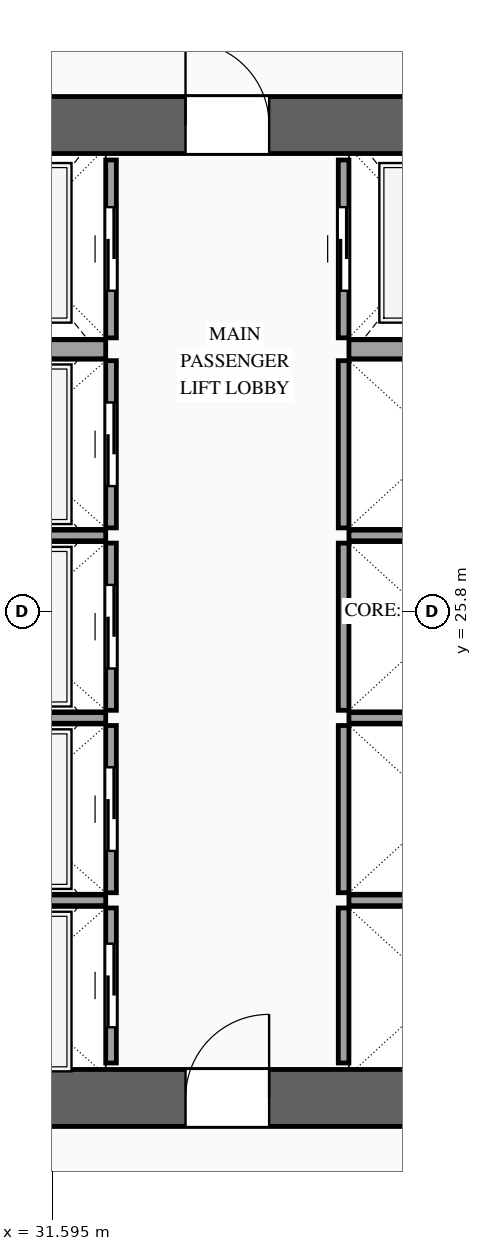
"""IFC4 building model, lengths in metres.
Left out: names, types, materials, properties, quantities, classifications, styles, units other than length and angle.
Written with IfcOpenShell. Run it as: python <this file> out.ifc"""

import sys

from ifc_helpers import new_model, si_unit, direction, frame, frame_2d, origin, place, context, subcontext, project, spatial, rectangle, extrude, source, transform, mapped, element, fill, save


model = new_model("IFC4")
c1 = context("Model", 3, precision=1e-05, world=origin(), true_north=direction((0.0, 1.0)))
c2 = subcontext(c1, "Body", "Model", "MODEL_VIEW")
j1 = project(units=[si_unit("LENGTHUNIT", "METRE"), si_unit("PLANEANGLEUNIT", "RADIAN")], contexts=[c1])
p1 = place(None, origin())
s1 = spatial("IfcSite", under=j1, at=p1, CompositionType="ELEMENT")
p2 = place(p1, origin())
s2 = spatial("IfcBuilding", under=s1, at=p2, CompositionType="ELEMENT")
p3 = place(p2, frame((0.0, 0.0, 141.6)))
s3 = spatial("IfcBuildingStorey", under=s2, at=p3, CompositionType="ELEMENT", Elevation=141.6)
p4 = place(p3, frame((23.425, 19.4, 0.0), z_axis=(0.0, 0.0, 1.0), x_axis=(1.0, 0.0, 0.0)))
e1 = element("IfcWall", 1, at=p4, inside=s3, PredefinedType="SHEAR", context=c2, shape_type="SweptSolid", body=[
    extrude(rectangle(XDim=27.15, YDim=0.75, at=frame_2d((13.575, 0.0))), origin(), (0.0, 0.0, 1.0), 3.6),
])
p5 = place(p4, frame((2.025, 0.0, 0.0)))
e2 = element("IfcOpeningElement", 2, at=p5, cuts=e1, PredefinedType="OPENING", context=c2, shape_type="SweptSolid", body=[
    extrude(rectangle(XDim=1.1, YDim=2.2, at=frame_2d((0.55, 1.1))), frame((0.0, 0.39, 0.0), z_axis=(0.0, -1.0, 0.0), x_axis=(1.0, 0.0, 0.0)), (0.0, 0.0, 1.0), 0.78),
])
p6 = place(p4, frame((9.925, 0.0, 0.0)))
e3 = element("IfcOpeningElement", 3, at=p6, cuts=e1, PredefinedType="OPENING", context=c2, shape_type="SweptSolid", body=[
    extrude(rectangle(XDim=1.1, YDim=2.2, at=frame_2d((0.55, 1.1))), frame((0.0, 0.39, 0.0), z_axis=(0.0, -1.0, 0.0), x_axis=(1.0, 0.0, 0.0)), (0.0, 0.0, 1.0), 0.78),
])
p7 = place(p4, frame((23.125, 0.0, 0.0)))
e4 = element("IfcOpeningElement", 4, at=p7, cuts=e1, PredefinedType="OPENING", context=c2, shape_type="SweptSolid", body=[
    extrude(rectangle(XDim=1.1, YDim=2.2, at=frame_2d((0.55, 1.1))), frame((0.0, 0.39, 0.0), z_axis=(0.0, -1.0, 0.0), x_axis=(1.0, 0.0, 0.0)), (0.0, 0.0, 1.0), 0.78),
])
p8 = place(p4, frame((19.745, 0.0, 0.0)))
e5 = element("IfcOpeningElement", 5, at=p8, cuts=e1, PredefinedType="OPENING", context=c2, shape_type="SweptSolid", body=[
    extrude(rectangle(XDim=0.9, YDim=2.15, at=frame_2d((0.45, 1.075))), frame((0.0, 0.39, 0.0), z_axis=(0.0, -1.0, 0.0), x_axis=(1.0, 0.0, 0.0)), (0.0, 0.0, 1.0), 0.78),
])
p9 = place(p4, frame((18.305, 0.0, 0.0)))
e6 = element("IfcOpeningElement", 6, at=p9, cuts=e1, PredefinedType="OPENING", context=c2, shape_type="SweptSolid", body=[
    extrude(rectangle(XDim=0.9, YDim=2.15, at=frame_2d((0.45, 1.075))), frame((0.0, 0.39, 0.0), z_axis=(0.0, -1.0, 0.0), x_axis=(1.0, 0.0, 0.0)), (0.0, 0.0, 1.0), 0.78),
])
p10 = place(p3, frame((23.425, 32.2, 0.0), z_axis=(0.0, 0.0, 1.0), x_axis=(1.0, 0.0, 0.0)))
e7 = element("IfcWall", 7, at=p10, inside=s3, PredefinedType="SHEAR", context=c2, shape_type="SweptSolid", body=[
    extrude(rectangle(XDim=27.15, YDim=0.75, at=frame_2d((13.575, 0.0))), origin(), (0.0, 0.0, 1.0), 3.6),
])
p11 = place(p10, frame((4.645, 0.0, 0.0)))
e8 = element("IfcOpeningElement", 8, at=p11, cuts=e7, PredefinedType="OPENING", context=c2, shape_type="SweptSolid", body=[
    extrude(rectangle(XDim=0.9, YDim=2.15, at=frame_2d((0.45, 1.075))), frame((0.0, 0.39, 0.0), z_axis=(0.0, -1.0, 0.0), x_axis=(1.0, 0.0, 0.0)), (0.0, 0.0, 1.0), 0.78),
])
p12 = place(p10, frame((9.925, 0.0, 0.0)))
e9 = element("IfcOpeningElement", 9, at=p12, cuts=e7, PredefinedType="OPENING", context=c2, shape_type="SweptSolid", body=[
    extrude(rectangle(XDim=1.1, YDim=2.2, at=frame_2d((0.55, 1.1))), frame((0.0, 0.39, 0.0), z_axis=(0.0, -1.0, 0.0), x_axis=(1.0, 0.0, 0.0)), (0.0, 0.0, 1.0), 0.78),
])
p13 = place(p10, frame((15.775, 0.0, 0.0)))
e10 = element("IfcOpeningElement", 10, at=p13, cuts=e7, PredefinedType="OPENING", context=c2, shape_type="SweptSolid", body=[
    extrude(rectangle(XDim=1.1, YDim=2.2, at=frame_2d((0.55, 1.1))), frame((0.0, 0.39, 0.0), z_axis=(0.0, -1.0, 0.0), x_axis=(1.0, 0.0, 0.0)), (0.0, 0.0, 1.0), 0.78),
])
p14 = place(p10, frame((18.975, 0.0, 0.0)))
e11 = element("IfcOpeningElement", 11, at=p14, cuts=e7, PredefinedType="OPENING", context=c2, shape_type="SweptSolid", body=[
    extrude(rectangle(XDim=0.9, YDim=2.15, at=frame_2d((0.45, 1.075))), frame((0.0, 0.39, 0.0), z_axis=(0.0, -1.0, 0.0), x_axis=(1.0, 0.0, 0.0)), (0.0, 0.0, 1.0), 0.78),
])
p15 = place(p3, frame((32.37, 19.86, 0.0), z_axis=(0.0, 0.0, 1.0), x_axis=(0.0, 1.0, 0.0)))
e12 = element("IfcWall", 12, at=p15, inside=s3, PredefinedType="SOLIDWALL", context=c2, shape_type="SweptSolid", body=[
    extrude(rectangle(XDim=2.04, YDim=0.14, at=frame_2d((1.02, 0.0))), origin(), (0.0, 0.0, 1.0), 3.38),
])
p16 = place(p15, frame((0.47, 0.0, 0.0)))
e13 = element("IfcOpeningElement", 13, at=p16, cuts=e12, PredefinedType="OPENING", context=c2, shape_type="SweptSolid", body=[
    extrude(rectangle(XDim=1.1, YDim=2.2, at=frame_2d((0.55, 1.1))), frame((0.0, 0.085, 0.0), z_axis=(0.0, -1.0, 0.0), x_axis=(1.0, 0.0, 0.0)), (0.0, 0.0, 1.0), 0.17),
])
m1 = source(origin(), c2, "Body", "SweptSolid", [
    extrude(rectangle(XDim=2.5, YDim=0.14, at=frame_2d((1.25, 0.0))), origin(), (0.0, 0.0, 1.0), 3.38),
])
p17 = place(p3, frame((29.8, 22.0, 0.0), z_axis=(0.0, 0.0, 1.0), x_axis=(1.0, 0.0, 0.0)))
e14 = element("IfcWall", 14, at=p17, inside=s3, PredefinedType="SOLIDWALL", context=c2, shape_type="MappedRepresentation", body=[
    mapped(m1, transform((0.0, 0.0, 0.0), scale=1.0)),
])
p18 = place(p3, frame((32.37, 22.1, 0.0), z_axis=(0.0, 0.0, 1.0), x_axis=(0.0, 1.0, 0.0)))
e15 = element("IfcWall", 15, at=p18, inside=s3, PredefinedType="SOLIDWALL", context=c2, shape_type="SweptSolid", body=[
    extrude(rectangle(XDim=2.2, YDim=0.14, at=frame_2d((1.1, 0.0))), origin(), (0.0, 0.0, 1.0), 3.38),
])
p19 = place(p18, frame((0.55, 0.0, 0.0)))
e16 = element("IfcOpeningElement", 16, at=p19, cuts=e15, PredefinedType="OPENING", context=c2, shape_type="SweptSolid", body=[
    extrude(rectangle(XDim=1.1, YDim=2.2, at=frame_2d((0.55, 1.1))), frame((0.0, 0.085, 0.0), z_axis=(0.0, -1.0, 0.0), x_axis=(1.0, 0.0, 0.0)), (0.0, 0.0, 1.0), 0.17),
])
p20 = place(p3, frame((29.8, 24.4, 0.0), z_axis=(0.0, 0.0, 1.0), x_axis=(1.0, 0.0, 0.0)))
e17 = element("IfcWall", 17, at=p20, inside=s3, PredefinedType="SOLIDWALL", context=c2, shape_type="MappedRepresentation", body=[
    mapped(m1, transform((0.0, 0.0, 0.0), scale=1.0)),
])
p21 = place(p3, frame((32.37, 24.5, 0.0), z_axis=(0.0, 0.0, 1.0), x_axis=(0.0, 1.0, 0.0)))
e18 = element("IfcWall", 18, at=p21, inside=s3, PredefinedType="SOLIDWALL", context=c2, shape_type="SweptSolid", body=[
    extrude(rectangle(XDim=2.2, YDim=0.14, at=frame_2d((1.1, 0.0))), origin(), (0.0, 0.0, 1.0), 3.38),
])
p22 = place(p21, frame((0.55, 0.0, 0.0)))
e19 = element("IfcOpeningElement", 19, at=p22, cuts=e18, PredefinedType="OPENING", context=c2, shape_type="SweptSolid", body=[
    extrude(rectangle(XDim=1.1, YDim=2.2, at=frame_2d((0.55, 1.1))), frame((0.0, 0.085, 0.0), z_axis=(0.0, -1.0, 0.0), x_axis=(1.0, 0.0, 0.0)), (0.0, 0.0, 1.0), 0.17),
])
p23 = place(p3, frame((29.8, 26.8, 0.0), z_axis=(0.0, 0.0, 1.0), x_axis=(1.0, 0.0, 0.0)))
e20 = element("IfcWall", 20, at=p23, inside=s3, PredefinedType="SOLIDWALL", context=c2, shape_type="MappedRepresentation", body=[
    mapped(m1, transform((0.0, 0.0, 0.0), scale=1.0)),
])
p24 = place(p3, frame((32.37, 26.9, 0.0), z_axis=(0.0, 0.0, 1.0), x_axis=(0.0, 1.0, 0.0)))
e21 = element("IfcWall", 21, at=p24, inside=s3, PredefinedType="SOLIDWALL", context=c2, shape_type="SweptSolid", body=[
    extrude(rectangle(XDim=2.2, YDim=0.14, at=frame_2d((1.1, 0.0))), origin(), (0.0, 0.0, 1.0), 3.38),
])
p25 = place(p24, frame((0.55, 0.0, 0.0)))
e22 = element("IfcOpeningElement", 22, at=p25, cuts=e21, PredefinedType="OPENING", context=c2, shape_type="SweptSolid", body=[
    extrude(rectangle(XDim=1.1, YDim=2.2, at=frame_2d((0.55, 1.1))), frame((0.0, 0.085, 0.0), z_axis=(0.0, -1.0, 0.0), x_axis=(1.0, 0.0, 0.0)), (0.0, 0.0, 1.0), 0.17),
])
p26 = place(p3, frame((32.37, 29.4, 0.0), z_axis=(0.0, 0.0, 1.0), x_axis=(0.0, 1.0, 0.0)))
e23 = element("IfcWall", 23, at=p26, inside=s3, PredefinedType="SOLIDWALL", context=c2, shape_type="SweptSolid", body=[
    extrude(rectangle(XDim=2.34, YDim=0.14, at=frame_2d((1.17, 0.0))), origin(), (0.0, 0.0, 1.0), 3.38),
])
p27 = place(p26, frame((0.62, 0.0, 0.0)))
e24 = element("IfcOpeningElement", 24, at=p27, cuts=e23, PredefinedType="OPENING", context=c2, shape_type="SweptSolid", body=[
    extrude(rectangle(XDim=1.1, YDim=2.2, at=frame_2d((0.55, 1.1))), frame((0.0, 0.085, 0.0), z_axis=(0.0, -1.0, 0.0), x_axis=(1.0, 0.0, 0.0)), (0.0, 0.0, 1.0), 0.17),
])
m2 = source(origin(), c2, "Body", "SweptSolid", [
    extrude(rectangle(XDim=2.5, YDim=0.25, at=frame_2d((1.25, 0.0))), origin(), (0.0, 0.0, 1.0), 3.38),
])
p28 = place(p3, frame((29.8, 29.25, 0.0), z_axis=(0.0, 0.0, 1.0), x_axis=(1.0, 0.0, 0.0)))
e25 = element("IfcWall", 25, at=p28, inside=s3, PredefinedType="SOLIDWALL", context=c2, shape_type="MappedRepresentation", body=[
    mapped(m2, transform((0.0, 0.0, 0.0), scale=1.0)),
])
m3 = source(origin(), c2, "Body", "SweptSolid", [
    extrude(rectangle(XDim=2.04, YDim=0.14, at=frame_2d((1.02, 0.0))), origin(), (0.0, 0.0, 1.0), 3.38),
])
p29 = place(p3, frame((35.43, 19.86, 0.0), z_axis=(0.0, 0.0, 1.0), x_axis=(0.0, 1.0, 0.0)))
e26 = element("IfcWall", 26, at=p29, inside=s3, PredefinedType="SOLIDWALL", context=c2, shape_type="MappedRepresentation", body=[
    mapped(m3, transform((0.0, 0.0, 0.0), scale=1.0)),
])
m4 = source(origin(), c2, "Body", "SweptSolid", [
    extrude(rectangle(XDim=2.4, YDim=0.14, at=frame_2d((1.2, 0.0))), origin(), (0.0, 0.0, 1.0), 3.38),
])
p30 = place(p3, frame((35.5, 22.0, 0.0), z_axis=(0.0, 0.0, 1.0), x_axis=(1.0, 0.0, 0.0)))
e27 = element("IfcWall", 27, at=p30, inside=s3, PredefinedType="SOLIDWALL", context=c2, shape_type="MappedRepresentation", body=[
    mapped(m4, transform((0.0, 0.0, 0.0), scale=1.0)),
])
m5 = source(origin(), c2, "Body", "SweptSolid", [
    extrude(rectangle(XDim=2.2, YDim=0.14, at=frame_2d((1.1, 0.0))), origin(), (0.0, 0.0, 1.0), 3.38),
])
p31 = place(p3, frame((35.43, 22.1, 0.0), z_axis=(0.0, 0.0, 1.0), x_axis=(0.0, 1.0, 0.0)))
e28 = element("IfcWall", 28, at=p31, inside=s3, PredefinedType="SOLIDWALL", context=c2, shape_type="MappedRepresentation", body=[
    mapped(m5, transform((0.0, 0.0, 0.0), scale=1.0)),
])
p32 = place(p3, frame((35.5, 24.4, 0.0), z_axis=(0.0, 0.0, 1.0), x_axis=(1.0, 0.0, 0.0)))
e29 = element("IfcWall", 29, at=p32, inside=s3, PredefinedType="SOLIDWALL", context=c2, shape_type="MappedRepresentation", body=[
    mapped(m4, transform((0.0, 0.0, 0.0), scale=1.0)),
])
p33 = place(p3, frame((35.43, 24.5, 0.0), z_axis=(0.0, 0.0, 1.0), x_axis=(0.0, 1.0, 0.0)))
e30 = element("IfcWall", 30, at=p33, inside=s3, PredefinedType="SOLIDWALL", context=c2, shape_type="MappedRepresentation", body=[
    mapped(m5, transform((0.0, 0.0, 0.0), scale=1.0)),
])
p34 = place(p3, frame((35.5, 26.8, 0.0), z_axis=(0.0, 0.0, 1.0), x_axis=(1.0, 0.0, 0.0)))
e31 = element("IfcWall", 31, at=p34, inside=s3, PredefinedType="SOLIDWALL", context=c2, shape_type="MappedRepresentation", body=[
    mapped(m4, transform((0.0, 0.0, 0.0), scale=1.0)),
])
m6 = source(origin(), c2, "Body", "SweptSolid", [
    extrude(rectangle(XDim=2.2, YDim=0.14, at=frame_2d((1.1, 0.0))), origin(), (0.0, 0.0, 1.0), 3.38),
])
p35 = place(p3, frame((35.43, 26.9, 0.0), z_axis=(0.0, 0.0, 1.0), x_axis=(0.0, 1.0, 0.0)))
e32 = element("IfcWall", 32, at=p35, inside=s3, PredefinedType="SOLIDWALL", context=c2, shape_type="MappedRepresentation", body=[
    mapped(m6, transform((0.0, 0.0, 0.0), scale=1.0)),
])
p36 = place(p3, frame((35.43, 29.4, 0.0), z_axis=(0.0, 0.0, 1.0), x_axis=(0.0, 1.0, 0.0)))
e33 = element("IfcWall", 33, at=p36, inside=s3, PredefinedType="SOLIDWALL", context=c2, shape_type="SweptSolid", body=[
    extrude(rectangle(XDim=2.34, YDim=0.14, at=frame_2d((1.17, 0.0))), origin(), (0.0, 0.0, 1.0), 3.38),
])
p37 = place(p36, frame((0.62, 0.0, 0.0)))
e34 = element("IfcOpeningElement", 34, at=p37, cuts=e33, PredefinedType="OPENING", context=c2, shape_type="SweptSolid", body=[
    extrude(rectangle(XDim=1.1, YDim=2.2, at=frame_2d((0.55, 1.1))), frame((0.0, 0.085, 0.0), z_axis=(0.0, -1.0, 0.0), x_axis=(1.0, 0.0, 0.0)), (0.0, 0.0, 1.0), 0.17),
])
m7 = source(origin(), c2, "Body", "SweptSolid", [
    extrude(rectangle(XDim=2.4, YDim=0.25, at=frame_2d((1.2, 0.0))), origin(), (0.0, 0.0, 1.0), 3.38),
])
p38 = place(p3, frame((35.5, 29.25, 0.0), z_axis=(0.0, 0.0, 1.0), x_axis=(1.0, 0.0, 0.0)))
e35 = element("IfcWall", 35, at=p38, inside=s3, PredefinedType="SOLIDWALL", context=c2, shape_type="MappedRepresentation", body=[
    mapped(m7, transform((0.0, 0.0, 0.0), scale=1.0)),
])
m8 = source(origin(), c2, "Body", "SweptSolid", [
    extrude(rectangle(XDim=1.1, YDim=2.2, at=frame_2d((0.55, 1.1))), frame((0.0, 0.025, 0.0), z_axis=(0.0, -1.0, 0.0), x_axis=(1.0, 0.0, 0.0)), (0.0, 0.0, 1.0), 0.05),
])
p39 = place(p16, origin())
e36 = element("IfcDoor", 36, at=p39, inside=s3, OperationType="SLIDING_TO_LEFT", PredefinedType="DOOR", context=c2, shape_type="MappedRepresentation", body=[
    mapped(m8, transform((0.0, 0.0, 0.0), scale=1.0)),
])
fill(e13, e36)
p40 = place(p19, origin())
e37 = element("IfcDoor", 37, at=p40, inside=s3, OperationType="SLIDING_TO_RIGHT", PredefinedType="DOOR", context=c2, shape_type="MappedRepresentation", body=[
    mapped(m8, transform((0.0, 0.0, 0.0), scale=1.0)),
])
fill(e16, e37)
p41 = place(p22, origin())
e38 = element("IfcDoor", 38, at=p41, inside=s3, OperationType="SLIDING_TO_LEFT", PredefinedType="DOOR", context=c2, shape_type="MappedRepresentation", body=[
    mapped(m8, transform((0.0, 0.0, 0.0), scale=1.0)),
])
fill(e19, e38)
p42 = place(p25, origin())
e39 = element("IfcDoor", 39, at=p42, inside=s3, OperationType="SLIDING_TO_RIGHT", PredefinedType="DOOR", context=c2, shape_type="MappedRepresentation", body=[
    mapped(m8, transform((0.0, 0.0, 0.0), scale=1.0)),
])
fill(e22, e39)
p43 = place(p27, origin())
e40 = element("IfcDoor", 40, at=p43, inside=s3, OperationType="SLIDING_TO_LEFT", PredefinedType="DOOR", context=c2, shape_type="MappedRepresentation", body=[
    mapped(m8, transform((0.0, 0.0, 0.0), scale=1.0)),
])
fill(e24, e40)
p44 = place(p37, origin())
e41 = element("IfcDoor", 41, at=p44, inside=s3, OperationType="SLIDING_TO_RIGHT", PredefinedType="DOOR", context=c2, shape_type="MappedRepresentation", body=[
    mapped(m8, transform((0.0, 0.0, 0.0), scale=1.0)),
])
fill(e34, e41)
m9 = source(origin(), c2, "Body", "SweptSolid", [
    extrude(rectangle(XDim=1.1, YDim=2.2, at=frame_2d((0.55, 1.1))), frame((0.0, 0.025, 0.0), z_axis=(0.0, -1.0, 0.0), x_axis=(1.0, 0.0, 0.0)), (0.0, 0.0, 1.0), 0.05),
])
p45 = place(p6, origin())
e42 = element("IfcDoor", 42, at=p45, inside=s3, OperationType="SINGLE_SWING_RIGHT", PredefinedType="DOOR", context=c2, shape_type="MappedRepresentation", body=[
    mapped(m9, transform((0.0, 0.0, 0.0), scale=1.0)),
])
fill(e3, e42)
p46 = place(p12, origin())
e43 = element("IfcDoor", 43, at=p46, inside=s3, OperationType="SINGLE_SWING_LEFT", PredefinedType="DOOR", context=c2, shape_type="MappedRepresentation", body=[
    mapped(m9, transform((0.0, 0.0, 0.0), scale=1.0)),
])
fill(e9, e43)
save(model, sys.argv[1])
